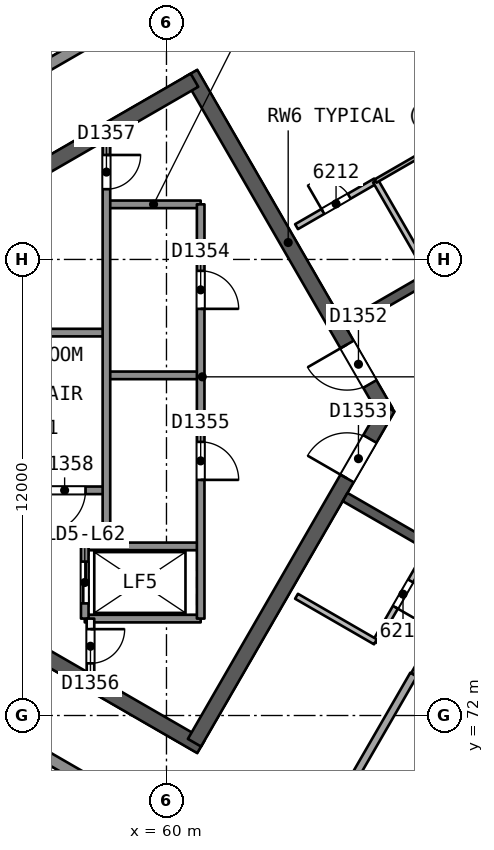
"""IFC4 building model, lengths in metres.
Left out: names, types, materials, properties, quantities, classifications, styles, units other than length and angle.
Written with IfcOpenShell. Run it as: python <this file> out.ifc"""

import sys

from ifc_helpers import new_model, si_unit, direction, frame, frame_2d, origin, place, context, subcontext, project, spatial, rectangle, extrude, element, fill, save


model = new_model("IFC4")
c1 = context("Model", 3, precision=1e-05, world=origin(), true_north=direction((0.0, 1.0)))
c2 = subcontext(c1, "Body", "Model", "MODEL_VIEW")
j1 = project(units=[si_unit("LENGTHUNIT", "METRE"), si_unit("PLANEANGLEUNIT", "RADIAN")], contexts=[c1])
p1 = place(None, origin())
s1 = spatial("IfcSite", under=j1, at=p1, CompositionType="ELEMENT")
p2 = place(p1, origin())
s2 = spatial("IfcBuilding", under=s1, at=p2, CompositionType="ELEMENT")
p3 = place(p2, frame((0.0, 0.0, 255.3)))
s3 = spatial("IfcBuildingStorey", under=s2, at=p3, CompositionType="ELEMENT", Elevation=255.3)
p4 = place(p3, frame((65.769, 80.0, 0.0), z_axis=(0.0, 0.0, 1.0), x_axis=(-0.50000177223, 0.866024380585, 0.0)))
e1 = element("IfcWall", 1, at=p4, inside=s3, PredefinedType="SHEAR", context=c2, shape_type="SweptSolid", body=[
    extrude(rectangle(XDim=10.265, YDim=0.4, at=frame_2d((5.132, 0.0))), origin(), (0.0, 0.0, 1.0), 3.7),
])
p5 = place(p4, frame((0.834, 0.0, 0.0)))
e2 = element("IfcOpeningElement", 2, at=p5, cuts=e1, PredefinedType="OPENING", context=c2, shape_type="SweptSolid", body=[
    extrude(rectangle(XDim=1.2, YDim=2.1, at=frame_2d((0.6, 1.05))), frame((0.0, 0.21, 0.0), z_axis=(0.0, -1.0, 0.0), x_axis=(1.0, 0.0, 0.0)), (0.0, 0.0, 1.0), 0.421),
])
p6 = place(p3, frame((60.737, 88.716, 0.0), z_axis=(0.0, 0.0, 1.0), x_axis=(-0.866028812667, -0.499994095595, 0.0)))
e3 = element("IfcWall", 3, at=p6, inside=s3, PredefinedType="SHEAR", context=c2, shape_type="SweptSolid", body=[
    extrude(rectangle(XDim=14.134, YDim=0.4, at=frame_2d((7.067, 0.0))), origin(), (0.0, 0.0, 1.0), 3.7),
])
p7 = place(p3, frame((48.597, 78.293, 0.0), z_axis=(0.0, 0.0, 1.0), x_axis=(0.866026024469, -0.499998924941, 0.0)))
e4 = element("IfcWall", 4, at=p7, inside=s3, PredefinedType="SHEAR", context=c2, shape_type="SweptSolid", body=[
    extrude(rectangle(XDim=14.218, YDim=0.4, at=frame_2d((7.109, 0.0))), origin(), (0.0, 0.0, 1.0), 3.7),
])
p8 = place(p3, frame((60.737, 71.284, 0.0), z_axis=(0.0, 0.0, 1.0), x_axis=(0.50000547566, 0.866022242388, 0.0)))
e5 = element("IfcWall", 5, at=p8, inside=s3, PredefinedType="SHEAR", context=c2, shape_type="SweptSolid", body=[
    extrude(rectangle(XDim=10.18, YDim=0.4, at=frame_2d((5.09, 0.0))), origin(), (0.0, 0.0, 1.0), 3.7),
])
p9 = place(p8, frame((8.03, 0.0, 0.0)))
e6 = element("IfcOpeningElement", 6, at=p9, cuts=e5, PredefinedType="OPENING", context=c2, shape_type="SweptSolid", body=[
    extrude(rectangle(XDim=1.2, YDim=2.1, at=frame_2d((0.6, 1.05))), frame((0.0, 0.21, 0.0), z_axis=(0.0, -1.0, 0.0), x_axis=(1.0, 0.0, 0.0)), (0.0, 0.0, 1.0), 0.421),
])
p10 = place(p3, frame((78.2, 90.046, 0.0), z_axis=(0.0, 0.0, 1.0), x_axis=(-0.866026492143, -0.499998114903, 0.0)))
e7 = element("IfcWall", 7, at=p10, inside=s3, PredefinedType="SHEAR", context=c2, shape_type="SweptSolid", body=[
    extrude(rectangle(XDim=15.588, YDim=0.25, at=frame_2d((7.794, 0.0))), origin(), (0.0, 0.0, 1.0), 3.3),
])
p11 = place(p10, frame((5.887, 0.0, 0.0)))
e8 = element("IfcOpeningElement", 8, at=p11, cuts=e7, PredefinedType="OPENING", context=c2, shape_type="SweptSolid", body=[
    extrude(rectangle(XDim=1.0, YDim=2.1, at=frame_2d((0.5, 1.05))), frame((0.0, 0.135, 0.0), z_axis=(0.0, -1.0, 0.0), x_axis=(1.0, 0.0, 0.0)), (0.0, 0.0, 1.0), 0.271),
])
p12 = place(p10, frame((9.481, 0.0, 0.0)))
e9 = element("IfcOpeningElement", 9, at=p12, cuts=e7, PredefinedType="OPENING", context=c2, shape_type="SweptSolid", body=[
    extrude(rectangle(XDim=1.0, YDim=2.1, at=frame_2d((0.5, 1.05))), frame((0.0, 0.135, 0.0), z_axis=(0.0, -1.0, 0.0), x_axis=(1.0, 0.0, 0.0)), (0.0, 0.0, 1.0), 0.271),
])
p13 = place(p3, frame((64.7, 77.748, 0.0), z_axis=(0.0, 0.0, 1.0), x_axis=(0.866026492143, -0.499998114903, 0.0)))
e10 = element("IfcWall", 10, at=p13, inside=s3, PredefinedType="SHEAR", context=c2, shape_type="SweptSolid", body=[
    extrude(rectangle(XDim=15.588, YDim=0.25, at=frame_2d((7.794, 0.0))), origin(), (0.0, 0.0, 1.0), 3.3),
])
p14 = place(p13, frame((2.747, 0.0, 0.0)))
e11 = element("IfcOpeningElement", 11, at=p14, cuts=e10, PredefinedType="OPENING", context=c2, shape_type="SweptSolid", body=[
    extrude(rectangle(XDim=1.0, YDim=2.1, at=frame_2d((0.5, 1.05))), frame((0.0, 0.135, 0.0), z_axis=(0.0, -1.0, 0.0), x_axis=(1.0, 0.0, 0.0)), (0.0, 0.0, 1.0), 0.271),
])
p15 = place(p13, frame((6.544, 0.0, 0.0)))
e12 = element("IfcOpeningElement", 12, at=p15, cuts=e10, PredefinedType="OPENING", context=c2, shape_type="SweptSolid", body=[
    extrude(rectangle(XDim=1.0, YDim=2.1, at=frame_2d((0.5, 1.05))), frame((0.0, 0.135, 0.0), z_axis=(0.0, -1.0, 0.0), x_axis=(1.0, 0.0, 0.0)), (0.0, 0.0, 1.0), 0.271),
])
p16 = place(p13, frame((10.441, 0.0, 0.0)))
e13 = element("IfcOpeningElement", 13, at=p16, cuts=e10, PredefinedType="OPENING", context=c2, shape_type="SweptSolid", body=[
    extrude(rectangle(XDim=1.0, YDim=2.1, at=frame_2d((0.5, 1.05))), frame((0.0, 0.135, 0.0), z_axis=(0.0, -1.0, 0.0), x_axis=(1.0, 0.0, 0.0)), (0.0, 0.0, 1.0), 0.271),
])
p17 = place(p13, frame((11.841, 0.0, 0.0)))
e14 = element("IfcOpeningElement", 14, at=p17, cuts=e10, PredefinedType="OPENING", context=c2, shape_type="SweptSolid", body=[
    extrude(rectangle(XDim=1.0, YDim=2.1, at=frame_2d((0.5, 1.05))), frame((0.0, 0.135, 0.0), z_axis=(0.0, -1.0, 0.0), x_axis=(1.0, 0.0, 0.0)), (0.0, 0.0, 1.0), 0.271),
])
p18 = place(p3, frame((65.924, 94.162, 0.0), z_axis=(0.0, 0.0, 1.0), x_axis=(0.499987464755, -0.86603264089, 0.0)))
e15 = element("IfcWall", 15, at=p18, inside=s3, PredefinedType="PARTITIONING", context=c2, shape_type="SweptSolid", body=[
    extrude(rectangle(XDim=9.702, YDim=0.2, at=frame_2d((4.851, 0.0))), origin(), (0.0, 0.0, 1.0), 3.3),
])
p19 = place(p3, frame((63.422, 84.863, 0.0), z_axis=(0.0, 0.0, 1.0), x_axis=(0.865994240961, 0.500053971709, 0.0)))
e16 = element("IfcWall", 16, at=p19, inside=s3, PredefinedType="PARTITIONING", context=c2, shape_type="SweptSolid", body=[
    extrude(rectangle(XDim=2.401, YDim=0.15, at=frame_2d((1.201, 0.0))), origin(), (0.0, 0.0, 1.0), 3.3),
])
p20 = place(p19, frame((0.801, 0.0, 0.0)))
e17 = element("IfcOpeningElement", 17, at=p20, cuts=e16, PredefinedType="OPENING", context=c2, shape_type="SweptSolid", body=[
    extrude(rectangle(XDim=0.8, YDim=2.1, at=frame_2d((0.4, 1.05))), frame((0.0, 0.085, 0.0), z_axis=(0.0, -1.0, 0.0), x_axis=(1.0, 0.0, 0.0)), (0.0, 0.0, 1.0), 0.171),
])
p21 = place(p3, frame((65.502, 86.063, 0.0), z_axis=(0.0, 0.0, 1.0), x_axis=(0.866055983265, 0.499947031044, 0.0)))
e18 = element("IfcWall", 18, at=p21, inside=s3, PredefinedType="PARTITIONING", context=c2, shape_type="SweptSolid", body=[
    extrude(rectangle(XDim=1.6, YDim=0.1, at=frame_2d((0.8, 0.0))), origin(), (0.0, 0.0, 1.0), 3.3),
])
p22 = place(p3, frame((66.952, 83.552, 0.0), z_axis=(0.0, 0.0, 1.0), x_axis=(-0.499987231761, 0.866032775405, 0.0)))
e19 = element("IfcWall", 19, at=p22, inside=s3, PredefinedType="PARTITIONING", context=c2, shape_type="SweptSolid", body=[
    extrude(rectangle(XDim=2.9, YDim=0.15, at=frame_2d((1.45, 0.0))), origin(), (0.0, 0.0, 1.0), 3.3),
])
p23 = place(p3, frame((66.949, 76.45, 0.0), z_axis=(0.0, 0.0, 1.0), x_axis=(-0.499987231761, -0.866032775405, 0.0)))
e20 = element("IfcWall", 20, at=p23, inside=s3, PredefinedType="PARTITIONING", context=c2, shape_type="SweptSolid", body=[
    extrude(rectangle(XDim=2.9, YDim=0.15, at=frame_2d((1.45, 0.0))), origin(), (0.0, 0.0, 1.0), 3.3),
])
p24 = place(p23, frame((1.05, 0.0, 0.0)))
e21 = element("IfcOpeningElement", 21, at=p24, cuts=e20, PredefinedType="OPENING", context=c2, shape_type="SweptSolid", body=[
    extrude(rectangle(XDim=0.8, YDim=2.1, at=frame_2d((0.4, 1.05))), frame((0.0, 0.085, 0.0), z_axis=(0.0, -1.0, 0.0), x_axis=(1.0, 0.0, 0.0)), (0.0, 0.0, 1.0), 0.171),
])
p25 = place(p3, frame((65.499, 73.938, 0.0), z_axis=(0.0, 0.0, 1.0), x_axis=(-0.866004188936, 0.500036743394, 0.0)))
e22 = element("IfcWall", 22, at=p25, inside=s3, PredefinedType="PARTITIONING", context=c2, shape_type="SweptSolid", body=[
    extrude(rectangle(XDim=2.398, YDim=0.15, at=frame_2d((1.199, 0.0))), origin(), (0.0, 0.0, 1.0), 3.3),
])
p26 = place(p3, frame((63.224, 67.397, 0.0), z_axis=(0.0, 0.0, 1.0), x_axis=(0.499983526171, 0.866034914745, 0.0)))
e23 = element("IfcWall", 23, at=p26, inside=s3, PredefinedType="PARTITIONING", context=c2, shape_type="SweptSolid", body=[
    extrude(rectangle(XDim=6.557, YDim=0.2, at=frame_2d((3.278, 0.0))), origin(), (0.0, 0.0, 1.0), 3.3),
])
p27 = place(p3, frame((66.502, 73.076, 0.0), z_axis=(0.0, 0.0, 1.0), x_axis=(0.499995674689, 0.86602790099, 0.0)))
e24 = element("IfcWall", 24, at=p27, inside=s3, PredefinedType="PARTITIONING", context=c2, shape_type="SweptSolid", body=[
    extrude(rectangle(XDim=3.146, YDim=0.15, at=frame_2d((1.573, 0.0))), origin(), (0.0, 0.0, 1.0), 3.3),
])
p28 = place(p3, frame((68.578, 71.877, 0.0), z_axis=(0.0, 0.0, 1.0), x_axis=(-0.866034636017, 0.499984008963, 0.0)))
e25 = element("IfcWall", 25, at=p28, inside=s3, PredefinedType="PARTITIONING", context=c2, shape_type="SweptSolid", body=[
    extrude(rectangle(XDim=2.397, YDim=0.15, at=frame_2d((1.198, 0.0))), origin(), (0.0, 0.0, 1.0), 3.3),
])
p29 = place(p3, frame((66.599, 65.449, 0.0), z_axis=(0.0, 0.0, 1.0), x_axis=(0.499983526171, 0.866034914745, 0.0)))
e26 = element("IfcWall", 26, at=p29, inside=s3, PredefinedType="PARTITIONING", context=c2, shape_type="SweptSolid", body=[
    extrude(rectangle(XDim=6.557, YDim=0.2, at=frame_2d((3.278, 0.0))), origin(), (0.0, 0.0, 1.0), 3.3),
])
p30 = place(p3, frame((45.416, 82.493, 0.0), z_axis=(0.0, 0.0, 1.0), x_axis=(0.866025373204, 0.500000052967, 0.0)))
e27 = element("IfcWall", 27, at=p30, inside=s3, PredefinedType="SOLIDWALL", context=c2, shape_type="SweptSolid", body=[
    extrude(rectangle(XDim=48.748, YDim=0.3, at=frame_2d((24.374, 0.0))), origin(), (0.0, 0.0, 1.0), 3.3),
])
p31 = place(p30, frame((35.015, 0.0, 0.0)))
e28 = element("IfcOpeningElement", 28, at=p31, cuts=e27, PredefinedType="OPENING", context=c2, shape_type="SweptSolid", body=[
    extrude(rectangle(XDim=2.4, YDim=2.4, at=frame_2d((1.2, 1.2))), frame((0.0, 0.161, 0.0), z_axis=(0.0, -1.0, 0.0), x_axis=(1.0, 0.0, 0.0)), (0.0, 0.0, 1.0), 0.321),
])
p32 = place(p30, frame((10.554, 0.0, 0.0)))
e29 = element("IfcOpeningElement", 29, at=p32, cuts=e27, PredefinedType="OPENING", context=c2, shape_type="SweptSolid", body=[
    extrude(rectangle(XDim=2.4, YDim=2.4, at=frame_2d((1.2, 1.2))), frame((0.0, 0.161, 0.0), z_axis=(0.0, -1.0, 0.0), x_axis=(1.0, 0.0, 0.0)), (0.0, 0.0, 1.0), 0.321),
])
p33 = place(p3, frame((87.633, 53.133, 0.0), z_axis=(0.0, 0.0, 1.0), x_axis=(-0.866025373204, 0.500000052967, 0.0)))
e30 = element("IfcWall", 30, at=p33, inside=s3, PredefinedType="SOLIDWALL", context=c2, shape_type="SweptSolid", body=[
    extrude(rectangle(XDim=48.748, YDim=0.3, at=frame_2d((24.374, 0.0))), origin(), (0.0, 0.0, 1.0), 3.3),
])
p34 = place(p33, frame((37.353, 0.0, 0.0)))
e31 = element("IfcOpeningElement", 31, at=p34, cuts=e30, PredefinedType="OPENING", context=c2, shape_type="SweptSolid", body=[
    extrude(rectangle(XDim=2.4, YDim=2.4, at=frame_2d((1.2, 1.2))), frame((0.0, 0.161, 0.0), z_axis=(0.0, -1.0, 0.0), x_axis=(1.0, 0.0, 0.0)), (0.0, 0.0, 1.0), 0.321),
])
p35 = place(p33, frame((8.995, 0.0, 0.0)))
e32 = element("IfcOpeningElement", 32, at=p35, cuts=e30, PredefinedType="OPENING", context=c2, shape_type="SweptSolid", body=[
    extrude(rectangle(XDim=2.4, YDim=2.4, at=frame_2d((1.2, 1.2))), frame((0.0, 0.161, 0.0), z_axis=(0.0, -1.0, 0.0), x_axis=(1.0, 0.0, 0.0)), (0.0, 0.0, 1.0), 0.321),
])
p36 = place(p33, frame((25.123, 0.0, 0.0)))
e33 = element("IfcOpeningElement", 33, at=p36, cuts=e30, PredefinedType="OPENING", context=c2, shape_type="SweptSolid", body=[
    extrude(rectangle(XDim=2.4, YDim=2.4, at=frame_2d((1.2, 1.2))), frame((0.0, 0.161, 0.0), z_axis=(0.0, -1.0, 0.0), x_axis=(1.0, 0.0, 0.0)), (0.0, 0.0, 1.0), 0.321),
])
p37 = place(p33, frame((21.226, 0.0, 0.0)))
e34 = element("IfcOpeningElement", 34, at=p37, cuts=e30, PredefinedType="OPENING", context=c2, shape_type="SweptSolid", body=[
    extrude(rectangle(XDim=2.4, YDim=2.4, at=frame_2d((1.2, 1.2))), frame((0.0, 0.161, 0.0), z_axis=(0.0, -1.0, 0.0), x_axis=(1.0, 0.0, 0.0)), (0.0, 0.0, 1.0), 0.321),
])
p38 = place(p3, frame((60.9, 85.45, 0.0), z_axis=(0.0, 0.0, 1.0), x_axis=(-1.0, 0.0, 0.0)))
e35 = element("IfcWall", 35, at=p38, inside=s3, PredefinedType="SOLIDWALL", context=c2, shape_type="SweptSolid", body=[
    extrude(rectangle(XDim=2.48, YDim=0.2, at=frame_2d((1.24, 0.0))), origin(), (0.0, 0.0, 1.0), 3.3),
])
p39 = place(p3, frame((58.42, 82.075, 0.0), z_axis=(0.0, 0.0, 1.0), x_axis=(-1.0, 0.0, 0.0)))
e36 = element("IfcWall", 36, at=p39, inside=s3, PredefinedType="SOLIDWALL", context=c2, shape_type="SweptSolid", body=[
    extrude(rectangle(XDim=7.7, YDim=0.2, at=frame_2d((3.85, 0.0))), origin(), (0.0, 0.0, 1.0), 3.3),
])
p40 = place(p3, frame((60.9, 80.95, 0.0), z_axis=(0.0, 0.0, 1.0), x_axis=(-1.0, 0.0, 0.0)))
e37 = element("IfcWall", 37, at=p40, inside=s3, PredefinedType="SOLIDWALL", context=c2, shape_type="SweptSolid", body=[
    extrude(rectangle(XDim=2.48, YDim=0.2, at=frame_2d((1.24, 0.0))), origin(), (0.0, 0.0, 1.0), 3.3),
])
p41 = place(p3, frame((58.42, 77.925, 0.0), z_axis=(0.0, 0.0, 1.0), x_axis=(-1.0, 0.0, 0.0)))
e38 = element("IfcWall", 38, at=p41, inside=s3, PredefinedType="SOLIDWALL", context=c2, shape_type="SweptSolid", body=[
    extrude(rectangle(XDim=7.7, YDim=0.2, at=frame_2d((3.85, 0.0))), origin(), (0.0, 0.0, 1.0), 3.3),
])
p42 = place(p41, frame((0.55, 0.0, 0.0)))
e39 = element("IfcOpeningElement", 39, at=p42, cuts=e38, PredefinedType="OPENING", context=c2, shape_type="SweptSolid", body=[
    extrude(rectangle(XDim=1.1, YDim=2.1, at=frame_2d((0.55, 1.05))), frame((0.0, 0.11, 0.0), z_axis=(0.0, -1.0, 0.0), x_axis=(1.0, 0.0, 0.0)), (0.0, 0.0, 1.0), 0.221),
])
for number, where, z_axis, x_axis in (
    (40, (60.9, 76.45, 0.0), (0.0, 0.0, 1.0), (-1.0, 0.0, 0.0)),
    (41, (60.9, 74.55, 0.0), (0.0, 0.0, 1.0), (-1.0, 0.0, 0.0)),
):
    element("IfcWall", number, at=place(p3, frame(where, z_axis=z_axis, x_axis=x_axis)), inside=s3, PredefinedType="SOLIDWALL", context=c2, shape_type="SweptSolid", body=[
        extrude(rectangle(XDim=3.05, YDim=0.2, at=frame_2d((1.525, 0.0))), origin(), (0.0, 0.0, 1.0), 3.3),
    ])
p43 = place(p3, frame((60.9, 85.45, 0.0), z_axis=(0.0, 0.0, 1.0), x_axis=(0.0, -1.0, 0.0)))
e42 = element("IfcWall", 42, at=p43, inside=s3, PredefinedType="SOLIDWALL", context=c2, shape_type="SweptSolid", body=[
    extrude(rectangle(XDim=10.9, YDim=0.2, at=frame_2d((5.45, 0.0))), origin(), (0.0, 0.0, 1.0), 3.3),
])
p44 = place(p43, frame((1.75, 0.0, 0.0)))
e43 = element("IfcOpeningElement", 43, at=p44, cuts=e42, PredefinedType="OPENING", context=c2, shape_type="SweptSolid", body=[
    extrude(rectangle(XDim=1.0, YDim=2.1, at=frame_2d((0.5, 1.05))), frame((0.0, 0.11, 0.0), z_axis=(0.0, -1.0, 0.0), x_axis=(1.0, 0.0, 0.0)), (0.0, 0.0, 1.0), 0.221),
])
p45 = place(p43, frame((6.25, 0.0, 0.0)))
e44 = element("IfcOpeningElement", 44, at=p45, cuts=e42, PredefinedType="OPENING", context=c2, shape_type="SweptSolid", body=[
    extrude(rectangle(XDim=1.0, YDim=2.1, at=frame_2d((0.5, 1.05))), frame((0.0, 0.11, 0.0), z_axis=(0.0, -1.0, 0.0), x_axis=(1.0, 0.0, 0.0)), (0.0, 0.0, 1.0), 0.221),
])
p46 = place(p3, frame((58.42, 87.148, 0.0), z_axis=(0.0, 0.0, 1.0), x_axis=(0.0, -1.0, 0.0)))
e45 = element("IfcWall", 45, at=p46, inside=s3, PredefinedType="SOLIDWALL", context=c2, shape_type="SweptSolid", body=[
    extrude(rectangle(XDim=10.698, YDim=0.2, at=frame_2d((5.349, 0.0))), origin(), (0.0, 0.0, 1.0), 3.3),
])
p47 = place(p46, frame((0.399, 0.0, 0.0)))
e46 = element("IfcOpeningElement", 46, at=p47, cuts=e45, PredefinedType="OPENING", context=c2, shape_type="SweptSolid", body=[
    extrude(rectangle(XDim=0.9, YDim=2.1, at=frame_2d((0.45, 1.05))), frame((0.0, 0.11, 0.0), z_axis=(0.0, -1.0, 0.0), x_axis=(1.0, 0.0, 0.0)), (0.0, 0.0, 1.0), 0.221),
])
p48 = place(p3, frame((58.0, 74.55, 0.0), z_axis=(0.0, 0.0, 1.0), x_axis=(0.0, -1.0, 0.0)))
e47 = element("IfcWall", 47, at=p48, inside=s3, PredefinedType="PARTITIONING", context=c2, shape_type="SweptSolid", body=[
    extrude(rectangle(XDim=1.455, YDim=0.2, at=frame_2d((0.728, 0.0))), origin(), (0.0, 0.0, 1.0), 3.3),
])
p49 = place(p48, frame((0.278, 0.0, 0.0)))
e48 = element("IfcOpeningElement", 48, at=p49, cuts=e47, PredefinedType="OPENING", context=c2, shape_type="SweptSolid", body=[
    extrude(rectangle(XDim=0.9, YDim=2.1, at=frame_2d((0.45, 1.05))), frame((0.0, 0.11, 0.0), z_axis=(0.0, -1.0, 0.0), x_axis=(1.0, 0.0, 0.0)), (0.0, 0.0, 1.0), 0.221),
])
p50 = place(p3, frame((57.85, 76.45, 0.0), z_axis=(0.0, 0.0, 1.0), x_axis=(0.0, -1.0, 0.0)))
e49 = element("IfcWall", 49, at=p50, inside=s3, PredefinedType="SOLIDWALL", context=c2, shape_type="SweptSolid", body=[
    extrude(rectangle(XDim=1.9, YDim=0.2, at=frame_2d((0.95, 0.0))), origin(), (0.0, 0.0, 1.0), 3.3),
])
p51 = place(p50, frame((0.4, 0.0, 0.0)))
e50 = element("IfcOpeningElement", 50, at=p51, cuts=e49, PredefinedType="OPENING", context=c2, shape_type="SweptSolid", body=[
    extrude(rectangle(XDim=1.1, YDim=2.1, at=frame_2d((0.55, 1.05))), frame((0.0, 0.11, 0.0), z_axis=(0.0, -1.0, 0.0), x_axis=(1.0, 0.0, 0.0)), (0.0, 0.0, 1.0), 0.221),
])
p52 = place(p20, origin())
e51 = element("IfcDoor", 51, at=p52, inside=s3, OperationType="SINGLE_SWING_LEFT", PredefinedType="NOTDEFINED", context=c2, shape_type="SweptSolid", body=[
    extrude(rectangle(XDim=0.8, YDim=2.1, at=frame_2d((0.4, 1.05))), frame((0.0, 0.025, 0.0), z_axis=(0.0, -1.0, 0.0), x_axis=(1.0, 0.0, 0.0)), (0.0, 0.0, 1.0), 0.05),
])
fill(e17, e51)
p53 = place(p24, origin())
e52 = element("IfcDoor", 52, at=p53, inside=s3, OperationType="SINGLE_SWING_RIGHT", PredefinedType="NOTDEFINED", context=c2, shape_type="SweptSolid", body=[
    extrude(rectangle(XDim=0.8, YDim=2.1, at=frame_2d((0.4, 1.05))), frame((0.0, 0.025, 0.0), z_axis=(0.0, -1.0, 0.0), x_axis=(1.0, 0.0, 0.0)), (0.0, 0.0, 1.0), 0.05),
])
fill(e21, e52)
p54 = place(p5, origin())
e53 = element("IfcDoor", 53, at=p54, inside=s3, OperationType="SINGLE_SWING_RIGHT", PredefinedType="NOTDEFINED", context=c2, shape_type="SweptSolid", body=[
    extrude(rectangle(XDim=1.2, YDim=2.1, at=frame_2d((0.6, 1.05))), frame((0.0, 0.025, 0.0), z_axis=(0.0, -1.0, 0.0), x_axis=(1.0, 0.0, 0.0)), (0.0, 0.0, 1.0), 0.05),
])
fill(e2, e53)
p55 = place(p9, origin())
e54 = element("IfcDoor", 54, at=p55, inside=s3, OperationType="SINGLE_SWING_LEFT", PredefinedType="NOTDEFINED", context=c2, shape_type="SweptSolid", body=[
    extrude(rectangle(XDim=1.2, YDim=2.1, at=frame_2d((0.6, 1.05))), frame((0.0, 0.025, 0.0), z_axis=(0.0, -1.0, 0.0), x_axis=(1.0, 0.0, 0.0)), (0.0, 0.0, 1.0), 0.05),
])
fill(e6, e54)
p56 = place(p51, origin())
e55 = element("IfcDoor", 55, at=p56, inside=s3, OperationType="SLIDING_TO_RIGHT", PredefinedType="NOTDEFINED", context=c2, shape_type="SweptSolid", body=[
    extrude(rectangle(XDim=1.1, YDim=2.1, at=frame_2d((0.55, 1.05))), frame((0.0, 0.025, 0.0), z_axis=(0.0, -1.0, 0.0), x_axis=(1.0, 0.0, 0.0)), (0.0, 0.0, 1.0), 0.05),
])
fill(e50, e55)
p57 = place(p44, origin())
e56 = element("IfcDoor", 56, at=p57, inside=s3, OperationType="SINGLE_SWING_RIGHT", PredefinedType="NOTDEFINED", context=c2, shape_type="SweptSolid", body=[
    extrude(rectangle(XDim=1.0, YDim=2.1, at=frame_2d((0.5, 1.05))), frame((0.0, 0.025, 0.0), z_axis=(0.0, -1.0, 0.0), x_axis=(1.0, 0.0, 0.0)), (0.0, 0.0, 1.0), 0.05),
])
fill(e43, e56)
p58 = place(p45, origin())
e57 = element("IfcDoor", 57, at=p58, inside=s3, OperationType="SINGLE_SWING_RIGHT", PredefinedType="NOTDEFINED", context=c2, shape_type="SweptSolid", body=[
    extrude(rectangle(XDim=1.0, YDim=2.1, at=frame_2d((0.5, 1.05))), frame((0.0, 0.025, 0.0), z_axis=(0.0, -1.0, 0.0), x_axis=(1.0, 0.0, 0.0)), (0.0, 0.0, 1.0), 0.05),
])
fill(e44, e57)
p59 = place(p49, origin())
e58 = element("IfcDoor", 58, at=p59, inside=s3, OperationType="SINGLE_SWING_LEFT", PredefinedType="NOTDEFINED", context=c2, shape_type="SweptSolid", body=[
    extrude(rectangle(XDim=0.9, YDim=2.1, at=frame_2d((0.45, 1.05))), frame((0.0, 0.025, 0.0), z_axis=(0.0, -1.0, 0.0), x_axis=(1.0, 0.0, 0.0)), (0.0, 0.0, 1.0), 0.05),
])
fill(e48, e58)
p60 = place(p47, origin())
e59 = element("IfcDoor", 59, at=p60, inside=s3, OperationType="SINGLE_SWING_LEFT", PredefinedType="NOTDEFINED", context=c2, shape_type="SweptSolid", body=[
    extrude(rectangle(XDim=0.9, YDim=2.1, at=frame_2d((0.45, 1.05))), frame((0.0, 0.025, 0.0), z_axis=(0.0, -1.0, 0.0), x_axis=(1.0, 0.0, 0.0)), (0.0, 0.0, 1.0), 0.05),
])
fill(e46, e59)
p61 = place(p42, origin())
e60 = element("IfcDoor", 60, at=p61, inside=s3, OperationType="SINGLE_SWING_RIGHT", PredefinedType="NOTDEFINED", context=c2, shape_type="SweptSolid", body=[
    extrude(rectangle(XDim=1.1, YDim=2.1, at=frame_2d((0.55, 1.05))), frame((0.0, 0.025, 0.0), z_axis=(0.0, -1.0, 0.0), x_axis=(1.0, 0.0, 0.0)), (0.0, 0.0, 1.0), 0.05),
])
fill(e39, e60)
save(model, sys.argv[1])
